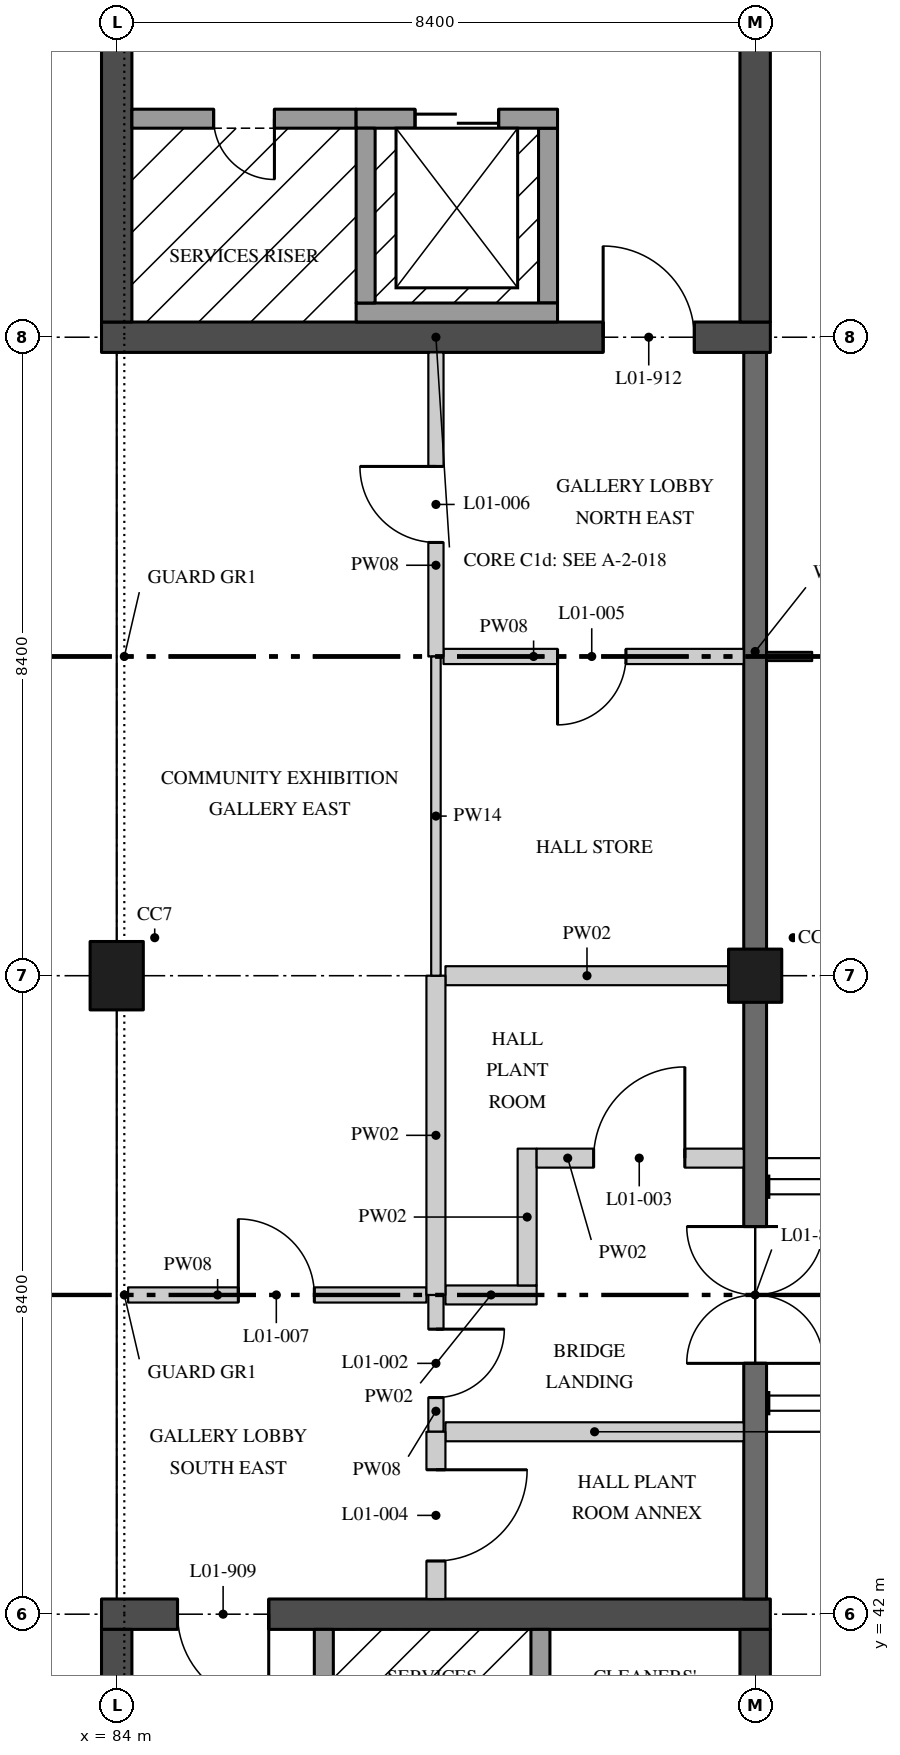
"""IFC4 building model, lengths in metres.
Left out: names, types, materials, properties, quantities, classifications, styles, units other than length and angle.
Written with IfcOpenShell. Run it as: python <this file> out.ifc"""

import sys

from ifc_helpers import new_model, si_unit, direction, frame, frame_2d, origin, origin_2d, place, context, subcontext, project, spatial, rectangle, extrude, element, fill, save


model = new_model("IFC4")
c1 = context("Model", 3, precision=1e-05, world=origin(), true_north=direction((0.0, 1.0)))
c2 = subcontext(c1, "Body", "Model", "MODEL_VIEW")
j1 = project(units=[si_unit("LENGTHUNIT", "METRE"), si_unit("PLANEANGLEUNIT", "RADIAN")], contexts=[c1])
p1 = place(None, origin())
s1 = spatial("IfcSite", under=j1, at=p1, CompositionType="ELEMENT")
p2 = place(p1, origin())
s2 = spatial("IfcBuilding", under=s1, at=p2, CompositionType="ELEMENT")
p3 = place(p2, frame((0.0, 0.0, 5.4)))
s3 = spatial("IfcBuildingStorey", under=s2, at=p3, CompositionType="ELEMENT", Elevation=5.4)
p4 = place(p3, frame((84.0, 50.4, 0.0), z_axis=(0.0, 0.0, 1.0), x_axis=(1.0, 0.0, 0.0)))
e1 = element("IfcColumn", 1, at=p4, inside=s3, PredefinedType="COLUMN", context=c2, shape_type="SweptSolid", body=[
    extrude(rectangle(XDim=0.7, YDim=0.9, at=origin_2d()), origin(), (0.0, 0.0, 1.0), 4.5),
])
p5 = place(p3, frame((92.4, 50.4, 0.0), z_axis=(0.0, 0.0, 1.0), x_axis=(1.0, 0.0, 0.0)))
e2 = element("IfcColumn", 2, at=p5, inside=s3, PredefinedType="COLUMN", context=c2, shape_type="SweptSolid", body=[
    extrude(rectangle(XDim=0.7, YDim=0.7, at=origin_2d()), origin(), (0.0, 0.0, 1.0), 4.5),
])
p6 = place(p3, frame((83.8, 42.0, 0.0), z_axis=(0.0, 0.0, 1.0), x_axis=(1.0, 0.0, 0.0)))
e3 = element("IfcWall", 3, at=p6, inside=s3, PredefinedType="SHEAR", context=c2, shape_type="SweptSolid", body=[
    extrude(rectangle(XDim=8.8, YDim=0.4, at=frame_2d((4.4, 0.0))), origin(), (0.0, 0.0, 1.0), 4.25),
])
p7 = place(p6, frame((1.0, 0.0, 0.0)))
e4 = element("IfcOpeningElement", 4, at=p7, cuts=e3, PredefinedType="OPENING", context=c2, shape_type="SweptSolid", body=[
    extrude(rectangle(XDim=1.2, YDim=2.1, at=frame_2d((0.6, 1.05))), frame((0.0, 0.21, 0.0), z_axis=(0.0, -1.0, 0.0), x_axis=(1.0, 0.0, 0.0)), (0.0, 0.0, 1.0), 0.42),
])
for number, where, z_axis, x_axis in (
    (5, (84.0, 33.8, 0.0), (0.0, 0.0, 1.0), (0.0, 1.0, 0.0)),
    (6, (92.4, 33.8, 0.0), (0.0, 0.0, 1.0), (0.0, 1.0, 0.0)),
):
    element("IfcWall", number, at=place(p3, frame(where, z_axis=z_axis, x_axis=x_axis)), inside=s3, PredefinedType="SHEAR", context=c2, shape_type="SweptSolid", body=[
        extrude(rectangle(XDim=8.0, YDim=0.4, at=frame_2d((4.0, 0.0))), origin(), (0.0, 0.0, 1.0), 4.25),
    ])
p8 = place(p3, frame((86.725, 39.0, 0.0), z_axis=(0.0, 0.0, 1.0), x_axis=(0.0, 1.0, 0.0)))
e7 = element("IfcWall", 7, at=p8, inside=s3, PredefinedType="SOLIDWALL", context=c2, shape_type="SweptSolid", body=[
    extrude(rectangle(XDim=2.8, YDim=0.25, at=frame_2d((1.4, 0.0))), origin(), (0.0, 0.0, 1.0), 4.25),
])
p9 = place(p3, frame((89.575, 39.25, 0.0), z_axis=(0.0, 0.0, 1.0), x_axis=(0.0, 1.0, 0.0)))
e8 = element("IfcWall", 8, at=p9, inside=s3, PredefinedType="SOLIDWALL", context=c2, shape_type="SweptSolid", body=[
    extrude(rectangle(XDim=2.55, YDim=0.25, at=frame_2d((1.275, 0.0))), origin(), (0.0, 0.0, 1.0), 4.25),
])
p10 = place(p3, frame((83.8, 58.8, 0.0), z_axis=(0.0, 0.0, 1.0), x_axis=(1.0, 0.0, 0.0)))
e9 = element("IfcWall", 9, at=p10, inside=s3, PredefinedType="SHEAR", context=c2, shape_type="SweptSolid", body=[
    extrude(rectangle(XDim=8.8, YDim=0.4, at=frame_2d((4.4, 0.0))), origin(), (0.0, 0.0, 1.0), 4.25),
])
p11 = place(p10, frame((6.6, 0.0, 0.0)))
e10 = element("IfcOpeningElement", 10, at=p11, cuts=e9, PredefinedType="OPENING", context=c2, shape_type="SweptSolid", body=[
    extrude(rectangle(XDim=1.2, YDim=2.1, at=frame_2d((0.6, 1.05))), frame((0.0, 0.21, 0.0), z_axis=(0.0, -1.0, 0.0), x_axis=(1.0, 0.0, 0.0)), (0.0, 0.0, 1.0), 0.42),
])
for number, where, z_axis, x_axis in (
    (11, (84.0, 59.0, 0.0), (0.0, 0.0, 1.0), (0.0, 1.0, 0.0)),
    (12, (92.4, 59.0, 0.0), (0.0, 0.0, 1.0), (0.0, 1.0, 0.0)),
):
    element("IfcWall", number, at=place(p3, frame(where, z_axis=z_axis, x_axis=x_axis)), inside=s3, PredefinedType="SHEAR", context=c2, shape_type="SweptSolid", body=[
        extrude(rectangle(XDim=8.0, YDim=0.4, at=frame_2d((4.0, 0.0))), origin(), (0.0, 0.0, 1.0), 4.25),
    ])
p12 = place(p3, frame((87.15, 61.675, 0.0), z_axis=(0.0, 0.0, 1.0), x_axis=(-1.0, 0.0, 0.0)))
e13 = element("IfcWall", 13, at=p12, inside=s3, PredefinedType="SOLIDWALL", context=c2, shape_type="SweptSolid", body=[
    extrude(rectangle(XDim=2.95, YDim=0.25, at=frame_2d((1.475, 0.0))), origin(), (0.0, 0.0, 1.0), 4.25),
])
p13 = place(p12, frame((1.075, 0.0, 0.0)))
e14 = element("IfcOpeningElement", 14, at=p13, cuts=e13, PredefinedType="OPENING", context=c2, shape_type="SweptSolid", body=[
    extrude(rectangle(XDim=0.8, YDim=2.1, at=frame_2d((0.4, 1.05))), frame((0.0, 0.135, 0.0), z_axis=(0.0, -1.0, 0.0), x_axis=(1.0, 0.0, 0.0)), (0.0, 0.0, 1.0), 0.27),
])
p14 = place(p3, frame((89.675, 59.25, 0.0), z_axis=(0.0, 0.0, 1.0), x_axis=(0.0, 1.0, 0.0)))
e15 = element("IfcWall", 15, at=p14, inside=s3, PredefinedType="SOLIDWALL", context=c2, shape_type="SweptSolid", body=[
    extrude(rectangle(XDim=2.3, YDim=0.25, at=frame_2d((1.15, 0.0))), origin(), (0.0, 0.0, 1.0), 4.25),
])
p15 = place(p3, frame((87.15, 61.675, 0.0), z_axis=(0.0, 0.0, 1.0), x_axis=(1.0, 0.0, 0.0)))
e16 = element("IfcWall", 16, at=p15, inside=s3, PredefinedType="SOLIDWALL", context=c2, shape_type="SweptSolid", body=[
    extrude(rectangle(XDim=2.65, YDim=0.25, at=frame_2d((1.325, 0.0))), origin(), (0.0, 0.0, 1.0), 4.25),
])
p16 = place(p15, frame((0.775, 0.0, 0.0)))
e17 = element("IfcOpeningElement", 17, at=p16, cuts=e16, PredefinedType="OPENING", context=c2, shape_type="SweptSolid", body=[
    extrude(rectangle(XDim=1.1, YDim=2.1, at=frame_2d((0.55, 1.05))), frame((0.0, 0.135, 0.0), z_axis=(0.0, -1.0, 0.0), x_axis=(1.0, 0.0, 0.0)), (0.0, 0.0, 1.0), 0.27),
])
p17 = place(p3, frame((87.15, 59.125, 0.0), z_axis=(0.0, 0.0, 1.0), x_axis=(1.0, 0.0, 0.0)))
e18 = element("IfcWall", 18, at=p17, inside=s3, PredefinedType="SOLIDWALL", context=c2, shape_type="SweptSolid", body=[
    extrude(rectangle(XDim=2.65, YDim=0.25, at=frame_2d((1.325, 0.0))), origin(), (0.0, 0.0, 1.0), 4.25),
])
p18 = place(p3, frame((87.275, 59.25, 0.0), z_axis=(0.0, 0.0, 1.0), x_axis=(0.0, 1.0, 0.0)))
e19 = element("IfcWall", 19, at=p18, inside=s3, PredefinedType="SOLIDWALL", context=c2, shape_type="SweptSolid", body=[
    extrude(rectangle(XDim=2.3, YDim=0.25, at=frame_2d((1.15, 0.0))), origin(), (0.0, 0.0, 1.0), 4.25),
])
p19 = place(p2, origin())
s4 = spatial("IfcBuildingStorey", under=s2, at=p19, CompositionType="ELEMENT", Elevation=0.0)
p20 = place(p19, frame((84.0, 54.6, 0.0), z_axis=(0.0, 0.0, 1.0), x_axis=(0.0, 1.0, 0.0)))
e20 = element("IfcWall", 20, at=p20, inside=s4, PredefinedType="PARTITIONING", context=c2, shape_type="SweptSolid", body=[
    extrude(rectangle(XDim=4.0, YDim=0.2, at=frame_2d((2.0, 0.0))), origin(), (0.0, 0.0, 1.0), 18.77),
])
p21 = place(p20, frame((1.5, 0.0, 0.0)))
e21 = element("IfcOpeningElement", 21, at=p21, cuts=e20, PredefinedType="OPENING", context=c2, shape_type="SweptSolid", body=[
    extrude(rectangle(XDim=1.0, YDim=2.4, at=frame_2d((0.5, 1.2))), frame((0.0, 0.11, 0.0), z_axis=(0.0, -1.0, 0.0), x_axis=(1.0, 0.0, 0.0)), (0.0, 0.0, 1.0), 0.22),
])
p22 = place(p19, frame((84.0, 42.2, 0.0), z_axis=(0.0, 0.0, 1.0), x_axis=(0.0, 1.0, 0.0)))
e22 = element("IfcWall", 22, at=p22, inside=s4, PredefinedType="PARTITIONING", context=c2, shape_type="SweptSolid", body=[
    extrude(rectangle(XDim=4.0, YDim=0.2, at=frame_2d((2.0, 0.0))), origin(), (0.0, 0.0, 1.0), 18.77),
])
p23 = place(p22, frame((1.5, 0.0, 0.0)))
e23 = element("IfcOpeningElement", 23, at=p23, cuts=e22, PredefinedType="OPENING", context=c2, shape_type="SweptSolid", body=[
    extrude(rectangle(XDim=1.0, YDim=2.4, at=frame_2d((0.5, 1.2))), frame((0.0, 0.11, 0.0), z_axis=(0.0, -1.0, 0.0), x_axis=(1.0, 0.0, 0.0)), (0.0, 0.0, 1.0), 0.22),
])
p24 = place(p19, frame((84.0, 46.2, 0.0), z_axis=(0.0, 0.0, 1.0), x_axis=(0.0, 1.0, 0.0)))
e24 = element("IfcWall", 24, at=p24, inside=s4, PredefinedType="PARTITIONING", context=c2, shape_type="SweptSolid", body=[
    extrude(rectangle(XDim=2.4, YDim=0.125, at=frame_2d((1.2, 0.0))), origin(), (0.0, 0.0, 1.0), 18.77),
])
p25 = place(p19, frame((84.0, 48.6, 0.0), z_axis=(0.0, 0.0, 1.0), x_axis=(0.0, 1.0, 0.0)))
e25 = element("IfcWall", 25, at=p25, inside=s4, PredefinedType="PARTITIONING", context=c2, shape_type="SweptSolid", body=[
    extrude(rectangle(XDim=1.35, YDim=0.125, at=frame_2d((0.675, 0.0))), origin(), (0.0, 0.0, 1.0), 18.77),
])
p26 = place(p19, frame((84.0, 50.85, 0.0), z_axis=(0.0, 0.0, 1.0), x_axis=(0.0, 1.0, 0.0)))
e26 = element("IfcWall", 26, at=p26, inside=s4, PredefinedType="PARTITIONING", context=c2, shape_type="SweptSolid", body=[
    extrude(rectangle(XDim=3.75, YDim=0.125, at=frame_2d((1.875, 0.0))), origin(), (0.0, 0.0, 1.0), 18.77),
])
p27 = place(p3, frame((88.2, 44.4, 0.0), z_axis=(0.0, 0.0, 1.0), x_axis=(0.0, 1.0, 0.0)))
e27 = element("IfcWall", 27, at=p27, inside=s3, PredefinedType="PARTITIONING", context=c2, shape_type="SweptSolid", body=[
    extrude(rectangle(XDim=1.8, YDim=0.2, at=frame_2d((0.9, 0.0))), origin(), (0.0, 0.0, 1.0), 4.25),
])
p28 = place(p27, frame((0.45, 0.0, 0.0)))
e28 = element("IfcOpeningElement", 28, at=p28, cuts=e27, PredefinedType="OPENING", context=c2, shape_type="SweptSolid", body=[
    extrude(rectangle(XDim=0.9, YDim=2.1, at=frame_2d((0.45, 1.05))), frame((0.0, 0.11, 0.0), z_axis=(0.0, -1.0, 0.0), x_axis=(1.0, 0.0, 0.0)), (0.0, 0.0, 1.0), 0.22),
])
p29 = place(p3, frame((88.325, 46.2, 0.0), z_axis=(0.0, 0.0, 1.0), x_axis=(1.0, 0.0, 0.0)))
e29 = element("IfcWall", 29, at=p29, inside=s3, PredefinedType="PARTITIONING", context=c2, shape_type="SweptSolid", body=[
    extrude(rectangle(XDim=1.2, YDim=0.25, at=frame_2d((0.6, 0.0))), origin(), (0.0, 0.0, 1.0), 4.25),
])
p30 = place(p3, frame((89.4, 46.325, 0.0), z_axis=(0.0, 0.0, 1.0), x_axis=(0.0, 1.0, 0.0)))
e30 = element("IfcWall", 30, at=p30, inside=s3, PredefinedType="PARTITIONING", context=c2, shape_type="SweptSolid", body=[
    extrude(rectangle(XDim=1.8, YDim=0.25, at=frame_2d((0.9, 0.0))), origin(), (0.0, 0.0, 1.0), 4.25),
])
p31 = place(p3, frame((89.525, 48.0, 0.0), z_axis=(0.0, 0.0, 1.0), x_axis=(1.0, 0.0, 0.0)))
e31 = element("IfcWall", 31, at=p31, inside=s3, PredefinedType="PARTITIONING", context=c2, shape_type="SweptSolid", body=[
    extrude(rectangle(XDim=2.725, YDim=0.25, at=frame_2d((1.363, 0.0))), origin(), (0.0, 0.0, 1.0), 4.25),
])
p32 = place(p31, frame((0.75, 0.0, 0.0)))
e32 = element("IfcOpeningElement", 32, at=p32, cuts=e31, PredefinedType="OPENING", context=c2, shape_type="SweptSolid", body=[
    extrude(rectangle(XDim=1.2, YDim=2.4, at=frame_2d((0.6, 1.2))), frame((0.0, 0.135, 0.0), z_axis=(0.0, -1.0, 0.0), x_axis=(1.0, 0.0, 0.0)), (0.0, 0.0, 1.0), 0.27),
])
p33 = place(p3, frame((88.325, 44.4, 0.0), z_axis=(0.0, 0.0, 1.0), x_axis=(1.0, 0.0, 0.0)))
e33 = element("IfcWall", 33, at=p33, inside=s3, PredefinedType="PARTITIONING", context=c2, shape_type="SweptSolid", body=[
    extrude(rectangle(XDim=3.925, YDim=0.25, at=frame_2d((1.962, 0.0))), origin(), (0.0, 0.0, 1.0), 4.25),
])
p34 = place(p3, frame((88.3, 54.6, 0.0), z_axis=(0.0, 0.0, 1.0), x_axis=(1.0, 0.0, 0.0)))
e34 = element("IfcWall", 34, at=p34, inside=s3, PredefinedType="PARTITIONING", context=c2, shape_type="SweptSolid", body=[
    extrude(rectangle(XDim=3.95, YDim=0.2, at=frame_2d((1.975, 0.0))), origin(), (0.0, 0.0, 1.0), 4.25),
])
p35 = place(p34, frame((1.5, 0.0, 0.0)))
e35 = element("IfcOpeningElement", 35, at=p35, cuts=e34, PredefinedType="OPENING", context=c2, shape_type="SweptSolid", body=[
    extrude(rectangle(XDim=0.9, YDim=2.1, at=frame_2d((0.45, 1.05))), frame((0.0, 0.11, 0.0), z_axis=(0.0, -1.0, 0.0), x_axis=(1.0, 0.0, 0.0)), (0.0, 0.0, 1.0), 0.22),
])
p36 = place(p3, frame((88.2, 54.6, 0.0), z_axis=(0.0, 0.0, 1.0), x_axis=(0.0, 1.0, 0.0)))
e36 = element("IfcWall", 36, at=p36, inside=s3, PredefinedType="PARTITIONING", context=c2, shape_type="SweptSolid", body=[
    extrude(rectangle(XDim=4.0, YDim=0.2, at=frame_2d((2.0, 0.0))), origin(), (0.0, 0.0, 1.0), 4.25),
])
p37 = place(p36, frame((1.5, 0.0, 0.0)))
e37 = element("IfcOpeningElement", 37, at=p37, cuts=e36, PredefinedType="OPENING", context=c2, shape_type="SweptSolid", body=[
    extrude(rectangle(XDim=1.0, YDim=2.4, at=frame_2d((0.5, 1.2))), frame((0.0, 0.11, 0.0), z_axis=(0.0, -1.0, 0.0), x_axis=(1.0, 0.0, 0.0)), (0.0, 0.0, 1.0), 0.22),
])
p38 = place(p3, frame((88.2, 42.2, 0.0), z_axis=(0.0, 0.0, 1.0), x_axis=(0.0, 1.0, 0.0)))
e38 = element("IfcWall", 38, at=p38, inside=s3, PredefinedType="PARTITIONING", context=c2, shape_type="SweptSolid", body=[
    extrude(rectangle(XDim=2.2, YDim=0.25, at=frame_2d((1.1, 0.0))), origin(), (0.0, 0.0, 1.0), 4.25),
])
p39 = place(p38, frame((0.5, 0.0, 0.0)))
e39 = element("IfcOpeningElement", 39, at=p39, cuts=e38, PredefinedType="OPENING", context=c2, shape_type="SweptSolid", body=[
    extrude(rectangle(XDim=1.2, YDim=2.4, at=frame_2d((0.6, 1.2))), frame((0.0, 0.135, 0.0), z_axis=(0.0, -1.0, 0.0), x_axis=(1.0, 0.0, 0.0)), (0.0, 0.0, 1.0), 0.27),
])
p40 = place(p3, frame((84.15, 46.2, 0.0), z_axis=(0.0, 0.0, 1.0), x_axis=(1.0, 0.0, 0.0)))
e40 = element("IfcWall", 40, at=p40, inside=s3, PredefinedType="PARTITIONING", context=c2, shape_type="SweptSolid", body=[
    extrude(rectangle(XDim=3.925, YDim=0.2, at=frame_2d((1.962, 0.0))), origin(), (0.0, 0.0, 1.0), 4.25),
])
p41 = place(p40, frame((1.45, 0.0, 0.0)))
e41 = element("IfcOpeningElement", 41, at=p41, cuts=e40, PredefinedType="OPENING", context=c2, shape_type="SweptSolid", body=[
    extrude(rectangle(XDim=1.0, YDim=2.4, at=frame_2d((0.5, 1.2))), frame((0.0, 0.11, 0.0), z_axis=(0.0, -1.0, 0.0), x_axis=(1.0, 0.0, 0.0)), (0.0, 0.0, 1.0), 0.22),
])
p42 = place(p3, frame((88.325, 50.4, 0.0), z_axis=(0.0, 0.0, 1.0), x_axis=(1.0, 0.0, 0.0)))
e42 = element("IfcWall", 42, at=p42, inside=s3, PredefinedType="PARTITIONING", context=c2, shape_type="SweptSolid", body=[
    extrude(rectangle(XDim=3.725, YDim=0.25, at=frame_2d((1.863, 0.0))), origin(), (0.0, 0.0, 1.0), 4.25),
])
p43 = place(p3, frame((88.2, 46.2, 0.0), z_axis=(0.0, 0.0, 1.0), x_axis=(0.0, 1.0, 0.0)))
e43 = element("IfcWall", 43, at=p43, inside=s3, PredefinedType="PARTITIONING", context=c2, shape_type="SweptSolid", body=[
    extrude(rectangle(XDim=4.2, YDim=0.25, at=frame_2d((2.1, 0.0))), origin(), (0.0, 0.0, 1.0), 4.25),
])
p44 = place(p3, frame((88.2, 50.4, 0.0), z_axis=(0.0, 0.0, 1.0), x_axis=(0.0, 1.0, 0.0)))
e44 = element("IfcWall", 44, at=p44, inside=s3, PredefinedType="PARTITIONING", context=c2, shape_type="SweptSolid", body=[
    extrude(rectangle(XDim=4.2, YDim=0.125, at=frame_2d((2.1, 0.0))), origin(), (0.0, 0.0, 1.0), 4.25),
])
p45 = place(p3, frame((92.4, 42.2, 0.0), z_axis=(0.0, 0.0, 1.0), x_axis=(0.0, 1.0, 0.0)))
e45 = element("IfcWall", 45, at=p45, inside=s3, PredefinedType="SOLIDWALL", context=c2, shape_type="SweptSolid", body=[
    extrude(rectangle(XDim=7.87, YDim=0.3, at=frame_2d((3.935, 0.0))), origin(), (0.0, 0.0, 1.0), 4.5),
])
p46 = place(p45, frame((3.1, 0.0, 0.0)))
e46 = element("IfcOpeningElement", 46, at=p46, cuts=e45, PredefinedType="OPENING", context=c2, shape_type="SweptSolid", body=[
    extrude(rectangle(XDim=1.8, YDim=2.4, at=frame_2d((0.9, 1.2))), frame((0.0, 0.16, 0.0), z_axis=(0.0, -1.0, 0.0), x_axis=(1.0, 0.0, 0.0)), (0.0, 0.0, 1.0), 0.32),
])
p47 = place(p3, frame((92.4, 50.73, 0.0), z_axis=(0.0, 0.0, 1.0), x_axis=(0.0, 1.0, 0.0)))
e47 = element("IfcWall", 47, at=p47, inside=s3, PredefinedType="SOLIDWALL", context=c2, shape_type="SweptSolid", body=[
    extrude(rectangle(XDim=7.87, YDim=0.3, at=frame_2d((3.935, 0.0))), origin(), (0.0, 0.0, 1.0), 4.5),
])
p48 = place(p7, frame((1.2, 0.0, 0.0), z_axis=(0.0, 0.0, 1.0), x_axis=(-1.0, 0.0, 0.0)))
e48 = element("IfcDoor", 48, at=p48, inside=s3, OperationType="SINGLE_SWING_RIGHT", PredefinedType="DOOR", context=c2, shape_type="SweptSolid", body=[
    extrude(rectangle(XDim=1.2, YDim=2.1, at=frame_2d((0.6, 1.05))), frame((0.0, 0.035, 0.0), z_axis=(0.0, -1.0, 0.0), x_axis=(1.0, 0.0, 0.0)), (0.0, 0.0, 1.0), 0.07),
])
fill(e4, e48)
p49 = place(p11, origin())
e49 = element("IfcDoor", 49, at=p49, inside=s3, OperationType="SINGLE_SWING_RIGHT", PredefinedType="DOOR", context=c2, shape_type="SweptSolid", body=[
    extrude(rectangle(XDim=1.2, YDim=2.1, at=frame_2d((0.6, 1.05))), frame((0.0, 0.035, 0.0), z_axis=(0.0, -1.0, 0.0), x_axis=(1.0, 0.0, 0.0)), (0.0, 0.0, 1.0), 0.07),
])
fill(e10, e49)
p50 = place(p13, origin())
e50 = element("IfcDoor", 50, at=p50, inside=s3, OperationType="SINGLE_SWING_RIGHT", PredefinedType="DOOR", context=c2, shape_type="SweptSolid", body=[
    extrude(rectangle(XDim=0.8, YDim=2.1, at=frame_2d((0.4, 1.05))), frame((0.0, 0.035, 0.0), z_axis=(0.0, -1.0, 0.0), x_axis=(1.0, 0.0, 0.0)), (0.0, 0.0, 1.0), 0.07),
])
fill(e14, e50)
p51 = place(p16, origin())
e51 = element("IfcDoor", 51, at=p51, inside=s3, OperationType="DOUBLE_DOOR_SLIDING", PredefinedType="DOOR", context=c2, shape_type="SweptSolid", body=[
    extrude(rectangle(XDim=1.1, YDim=2.1, at=frame_2d((0.55, 1.05))), frame((0.0, 0.04, 0.0), z_axis=(0.0, -1.0, 0.0), x_axis=(1.0, 0.0, 0.0)), (0.0, 0.0, 1.0), 0.08),
])
fill(e17, e51)
p52 = place(p28, frame((0.9, 0.0, 0.0), z_axis=(0.0, 0.0, 1.0), x_axis=(-1.0, 0.0, 0.0)))
e52 = element("IfcDoor", 52, at=p52, inside=s3, OperationType="SINGLE_SWING_RIGHT", PredefinedType="DOOR", context=c2, shape_type="SweptSolid", body=[
    extrude(rectangle(XDim=0.9, YDim=2.1, at=frame_2d((0.45, 1.05))), frame((0.0, 0.03, 0.0), z_axis=(0.0, -1.0, 0.0), x_axis=(1.0, 0.0, 0.0)), (0.0, 0.0, 1.0), 0.06),
])
fill(e28, e52)
p53 = place(p32, origin())
e53 = element("IfcDoor", 53, at=p53, inside=s3, OperationType="SINGLE_SWING_LEFT", PredefinedType="DOOR", context=c2, shape_type="SweptSolid", body=[
    extrude(rectangle(XDim=1.2, YDim=2.4, at=frame_2d((0.6, 1.2))), frame((0.0, 0.05, 0.0), z_axis=(0.0, -1.0, 0.0), x_axis=(1.0, 0.0, 0.0)), (0.0, 0.0, 1.0), 0.1),
])
fill(e32, e53)
p54 = place(p39, frame((1.2, 0.0, 0.0), z_axis=(0.0, 0.0, 1.0), x_axis=(-1.0, 0.0, 0.0)))
e54 = element("IfcDoor", 54, at=p54, inside=s3, OperationType="SINGLE_SWING_RIGHT", PredefinedType="DOOR", context=c2, shape_type="SweptSolid", body=[
    extrude(rectangle(XDim=1.2, YDim=2.4, at=frame_2d((0.6, 1.2))), frame((0.0, 0.05, 0.0), z_axis=(0.0, -1.0, 0.0), x_axis=(1.0, 0.0, 0.0)), (0.0, 0.0, 1.0), 0.1),
])
fill(e39, e54)
p55 = place(p35, frame((0.9, 0.0, 0.0), z_axis=(0.0, 0.0, 1.0), x_axis=(-1.0, 0.0, 0.0)))
e55 = element("IfcDoor", 55, at=p55, inside=s3, OperationType="SINGLE_SWING_LEFT", PredefinedType="DOOR", context=c2, shape_type="SweptSolid", body=[
    extrude(rectangle(XDim=0.9, YDim=2.1, at=frame_2d((0.45, 1.05))), frame((0.0, 0.03, 0.0), z_axis=(0.0, -1.0, 0.0), x_axis=(1.0, 0.0, 0.0)), (0.0, 0.0, 1.0), 0.06),
])
fill(e35, e55)
p56 = place(p37, origin())
e56 = element("IfcDoor", 56, at=p56, inside=s3, OperationType="SINGLE_SWING_LEFT", PredefinedType="DOOR", context=c2, shape_type="SweptSolid", body=[
    extrude(rectangle(XDim=1.0, YDim=2.4, at=frame_2d((0.5, 1.2))), frame((0.0, 0.035, 0.0), z_axis=(0.0, -1.0, 0.0), x_axis=(1.0, 0.0, 0.0)), (0.0, 0.0, 1.0), 0.07),
])
fill(e37, e56)
p57 = place(p41, origin())
e57 = element("IfcDoor", 57, at=p57, inside=s3, OperationType="SINGLE_SWING_RIGHT", PredefinedType="DOOR", context=c2, shape_type="SweptSolid", body=[
    extrude(rectangle(XDim=1.0, YDim=2.4, at=frame_2d((0.5, 1.2))), frame((0.0, 0.035, 0.0), z_axis=(0.0, -1.0, 0.0), x_axis=(1.0, 0.0, 0.0)), (0.0, 0.0, 1.0), 0.07),
])
fill(e41, e57)
p58 = place(p46, frame((1.8, 0.0, 0.0), z_axis=(0.0, 0.0, 1.0), x_axis=(-1.0, 0.0, 0.0)))
e58 = element("IfcDoor", 58, at=p58, inside=s3, OperationType="DOUBLE_DOOR_DOUBLE_SWING", PredefinedType="DOOR", context=c2, shape_type="SweptSolid", body=[
    extrude(rectangle(XDim=1.8, YDim=2.4, at=frame_2d((0.9, 1.2))), frame((0.0, 0.025, 0.0), z_axis=(0.0, -1.0, 0.0), x_axis=(1.0, 0.0, 0.0)), (0.0, 0.0, 1.0), 0.05),
])
fill(e46, e58)
save(model, sys.argv[1])
